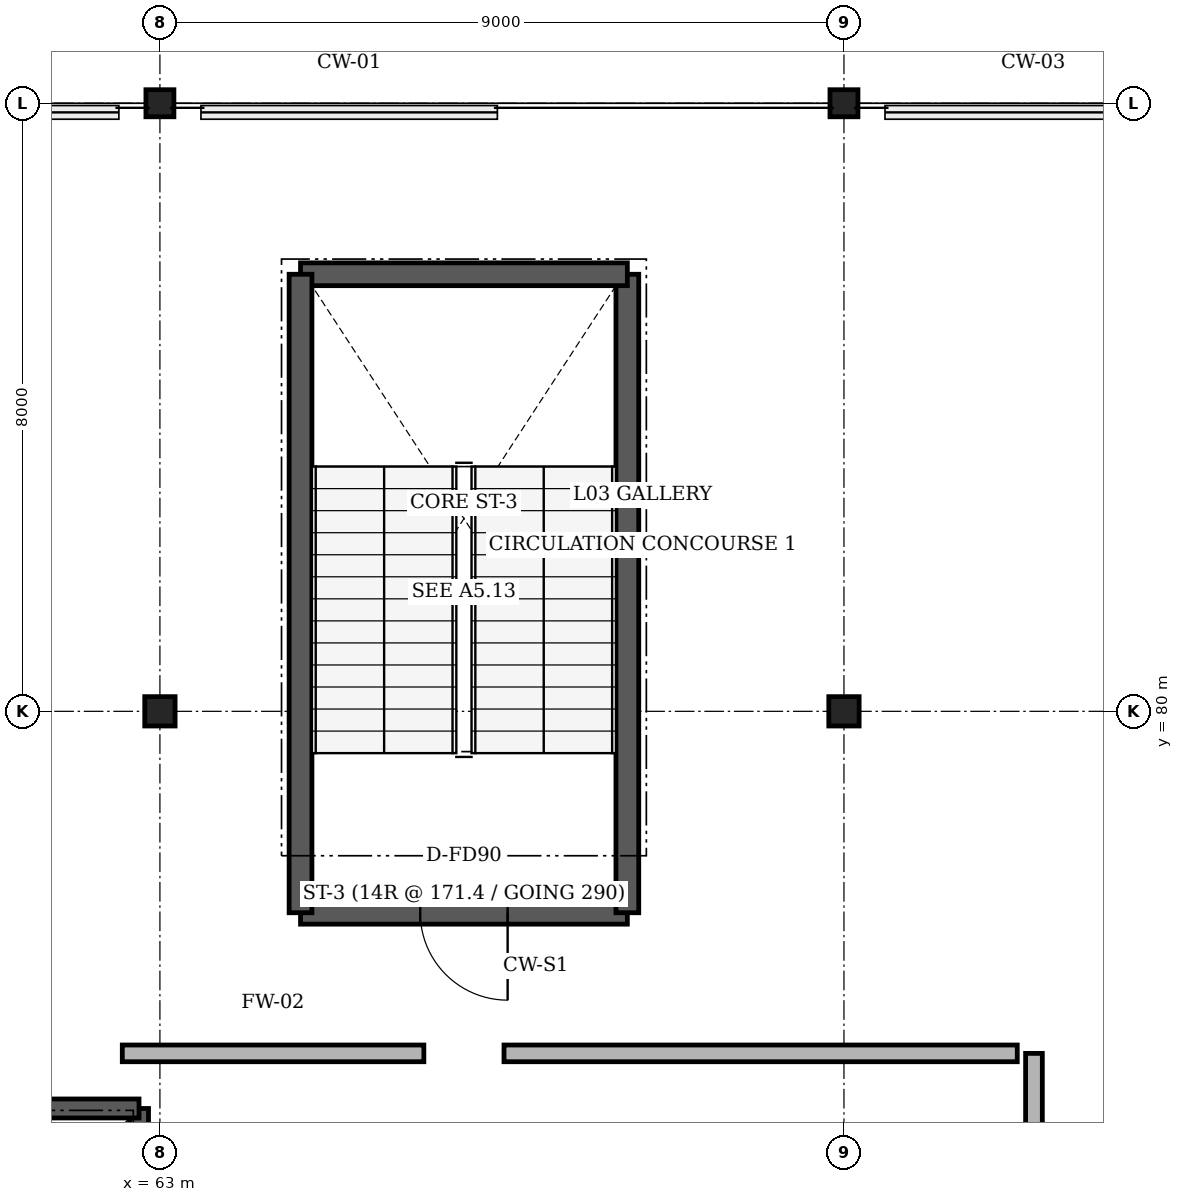
"""IFC4 building model, lengths in metres.
Left out: names, types, materials, properties, quantities, classifications, styles, units other than length and angle.
Written with IfcOpenShell. Run it as: python <this file> out.ifc"""

import sys

from ifc_helpers import new_model, si_unit, direction, frame, frame_2d, origin, origin_2d, place, context, subcontext, project, spatial, rectangle, i_section, extrude, element, fill, save


model = new_model("IFC4")
c1 = context("Model", 3, precision=1e-05, world=origin(), true_north=direction((0.0, 1.0)))
c2 = subcontext(c1, "Body", "Model", "MODEL_VIEW")
j1 = project(units=[si_unit("LENGTHUNIT", "METRE"), si_unit("PLANEANGLEUNIT", "RADIAN")], contexts=[c1])
p1 = place(None, origin())
s1 = spatial("IfcSite", under=j1, at=p1, CompositionType="ELEMENT")
p2 = place(p1, origin())
s2 = spatial("IfcBuilding", under=s1, at=p2, CompositionType="ELEMENT")
p3 = place(p2, frame((0.0, 0.0, 15.6)))
s3 = spatial("IfcBuildingStorey", under=s2, at=p3, CompositionType="ELEMENT", Elevation=15.6)
p4 = place(p3, frame((63.0, 80.0, 0.0), z_axis=(0.0, 0.0, 1.0), x_axis=(1.0, 0.0, 0.0)))
e1 = element("IfcColumn", 1, at=p4, inside=s3, PredefinedType="COLUMN", context=c2, shape_type="SweptSolid", body=[
    extrude(i_section(OverallWidth=0.399, OverallDepth=0.386, WebThickness=0.021, FlangeThickness=0.033, FilletRadius=0.015, at=origin_2d()), origin(), (0.0, 0.0, 1.0), 4.8),
])
p5 = place(p3, frame((63.0, 88.0, 0.0), z_axis=(0.0, 0.0, 1.0), x_axis=(1.0, 0.0, 0.0)))
e2 = element("IfcColumn", 2, at=p5, inside=s3, PredefinedType="COLUMN", context=c2, shape_type="SweptSolid", body=[
    extrude(i_section(OverallWidth=0.368, OverallDepth=0.356, WebThickness=0.011, FlangeThickness=0.018, FilletRadius=0.015, at=origin_2d()), origin(), (0.0, 0.0, 1.0), 4.8),
])
p6 = place(p3, frame((72.0, 80.0, 0.0), z_axis=(0.0, 0.0, 1.0), x_axis=(1.0, 0.0, 0.0)))
e3 = element("IfcColumn", 3, at=p6, inside=s3, PredefinedType="COLUMN", context=c2, shape_type="SweptSolid", body=[
    extrude(i_section(OverallWidth=0.399, OverallDepth=0.386, WebThickness=0.021, FlangeThickness=0.033, FilletRadius=0.015, at=origin_2d()), origin(), (0.0, 0.0, 1.0), 4.8),
])
p7 = place(p3, frame((72.0, 88.0, 0.0), z_axis=(0.0, 0.0, 1.0), x_axis=(1.0, 0.0, 0.0)))
e4 = element("IfcColumn", 4, at=p7, inside=s3, PredefinedType="COLUMN", context=c2, shape_type="SweptSolid", body=[
    extrude(i_section(OverallWidth=0.368, OverallDepth=0.356, WebThickness=0.011, FlangeThickness=0.018, FilletRadius=0.015, at=origin_2d()), origin(), (0.0, 0.0, 1.0), 4.8),
])
p8 = place(p3, frame((69.15, 77.35, 0.0), z_axis=(0.0, 0.0, 1.0), x_axis=(-1.0, 0.0, 0.0)))
e5 = element("IfcWall", 5, at=p8, inside=s3, PredefinedType="SOLIDWALL", context=c2, shape_type="SweptSolid", body=[
    extrude(rectangle(XDim=4.3, YDim=0.3, at=frame_2d((2.15, 0.0))), origin(), (0.0, 0.0, 1.0), 4.8),
])
p9 = place(p8, frame((1.575, 0.0, 0.0)))
e6 = element("IfcOpeningElement", 6, at=p9, cuts=e5, PredefinedType="OPENING", context=c2, shape_type="SweptSolid", body=[
    extrude(rectangle(XDim=1.15, YDim=2.2, at=frame_2d((0.575, 1.1))), frame((0.0, 0.16, 0.0), z_axis=(0.0, -1.0, 0.0), x_axis=(1.0, 0.0, 0.0)), (0.0, 0.0, 1.0), 0.32),
])
p10 = place(p3, frame((69.15, 77.35, 0.0), z_axis=(0.0, 0.0, 1.0), x_axis=(0.0, 1.0, 0.0)))
e7 = element("IfcWall", 7, at=p10, inside=s3, PredefinedType="SOLIDWALL", context=c2, shape_type="SweptSolid", body=[
    extrude(rectangle(XDim=8.4, YDim=0.3, at=frame_2d((4.2, 0.0))), origin(), (0.0, 0.0, 1.0), 4.8),
])
p11 = place(p3, frame((69.15, 85.75, 0.0), z_axis=(0.0, 0.0, 1.0), x_axis=(-1.0, 0.0, 0.0)))
e8 = element("IfcWall", 8, at=p11, inside=s3, PredefinedType="SOLIDWALL", context=c2, shape_type="SweptSolid", body=[
    extrude(rectangle(XDim=4.3, YDim=0.3, at=frame_2d((2.15, 0.0))), origin(), (0.0, 0.0, 1.0), 4.8),
])
p12 = place(p3, frame((64.85, 77.35, 0.0), z_axis=(0.0, 0.0, 1.0), x_axis=(0.0, 1.0, 0.0)))
e9 = element("IfcWall", 9, at=p12, inside=s3, PredefinedType="SOLIDWALL", context=c2, shape_type="SweptSolid", body=[
    extrude(rectangle(XDim=8.4, YDim=0.3, at=frame_2d((4.2, 0.0))), origin(), (0.0, 0.0, 1.0), 4.8),
])
p13 = place(p3, frame((62.725, 72.225, 0.0), z_axis=(0.0, 0.0, 1.0), x_axis=(0.0, 1.0, 0.0)))
e10 = element("IfcWall", 10, at=p13, inside=s3, PredefinedType="SOLIDWALL", context=c2, shape_type="SweptSolid", body=[
    extrude(rectangle(XDim=2.55, YDim=0.25, at=frame_2d((1.275, 0.0))), origin(), (0.0, 0.0, 1.0), 4.8),
])
p14 = place(p3, frame((62.725, 74.775, 0.0), z_axis=(0.0, 0.0, 1.0), x_axis=(-1.0, 0.0, 0.0)))
e11 = element("IfcWall", 11, at=p14, inside=s3, PredefinedType="SOLIDWALL", context=c2, shape_type="SweptSolid", body=[
    extrude(rectangle(XDim=2.45, YDim=0.25, at=frame_2d((1.225, 0.0))), origin(), (0.0, 0.0, 1.0), 4.8),
])
p15 = place(p3, frame((74.5, 75.5, 0.0), z_axis=(0.0, 0.0, 1.0), x_axis=(0.0, -1.0, 0.0)))
e12 = element("IfcWall", 12, at=p15, inside=s3, PredefinedType="SOLIDWALL", context=c2, shape_type="SweptSolid", body=[
    extrude(rectangle(XDim=11.25, YDim=0.22, at=frame_2d((5.625, 0.0))), origin(), (0.0, 0.0, 1.0), 3.15),
])
p16 = place(p15, frame((4.95, 0.0, 0.0)))
e13 = element("IfcOpeningElement", 13, at=p16, cuts=e12, PredefinedType="OPENING", context=c2, shape_type="SweptSolid", body=[
    extrude(rectangle(XDim=1.35, YDim=2.2, at=frame_2d((0.675, 1.1))), frame((0.0, 0.12, 0.0), z_axis=(0.0, -1.0, 0.0), x_axis=(1.0, 0.0, 0.0)), (0.0, 0.0, 1.0), 0.24),
])
p17 = place(p3, frame((62.505, 75.5, 0.0), z_axis=(0.0, 0.0, 1.0), x_axis=(1.0, 0.0, 0.0)))
e14 = element("IfcWall", 14, at=p17, inside=s3, PredefinedType="SOLIDWALL", context=c2, shape_type="SweptSolid", body=[
    extrude(rectangle(XDim=3.968, YDim=0.22, at=frame_2d((1.984, 0.0))), origin(), (0.0, 0.0, 1.0), 3.15),
])
p18 = place(p3, frame((67.527, 75.5, 0.0), z_axis=(0.0, 0.0, 1.0), x_axis=(1.0, 0.0, 0.0)))
e15 = element("IfcWall", 15, at=p18, inside=s3, PredefinedType="SOLIDWALL", context=c2, shape_type="SweptSolid", body=[
    extrude(rectangle(XDim=6.753, YDim=0.22, at=frame_2d((3.376, 0.0))), origin(), (0.0, 0.0, 1.0), 3.15),
])
p19 = place(p9, origin())
e16 = element("IfcDoor", 16, at=p19, inside=s3, OperationType="SINGLE_SWING_LEFT", PredefinedType="DOOR", context=c2, shape_type="SweptSolid", body=[
    extrude(rectangle(XDim=1.15, YDim=2.2, at=frame_2d((0.575, 1.1))), frame((0.0, 0.025, 0.0), z_axis=(0.0, -1.0, 0.0), x_axis=(1.0, 0.0, 0.0)), (0.0, 0.0, 1.0), 0.05),
])
fill(e6, e16)
save(model, sys.argv[1])
